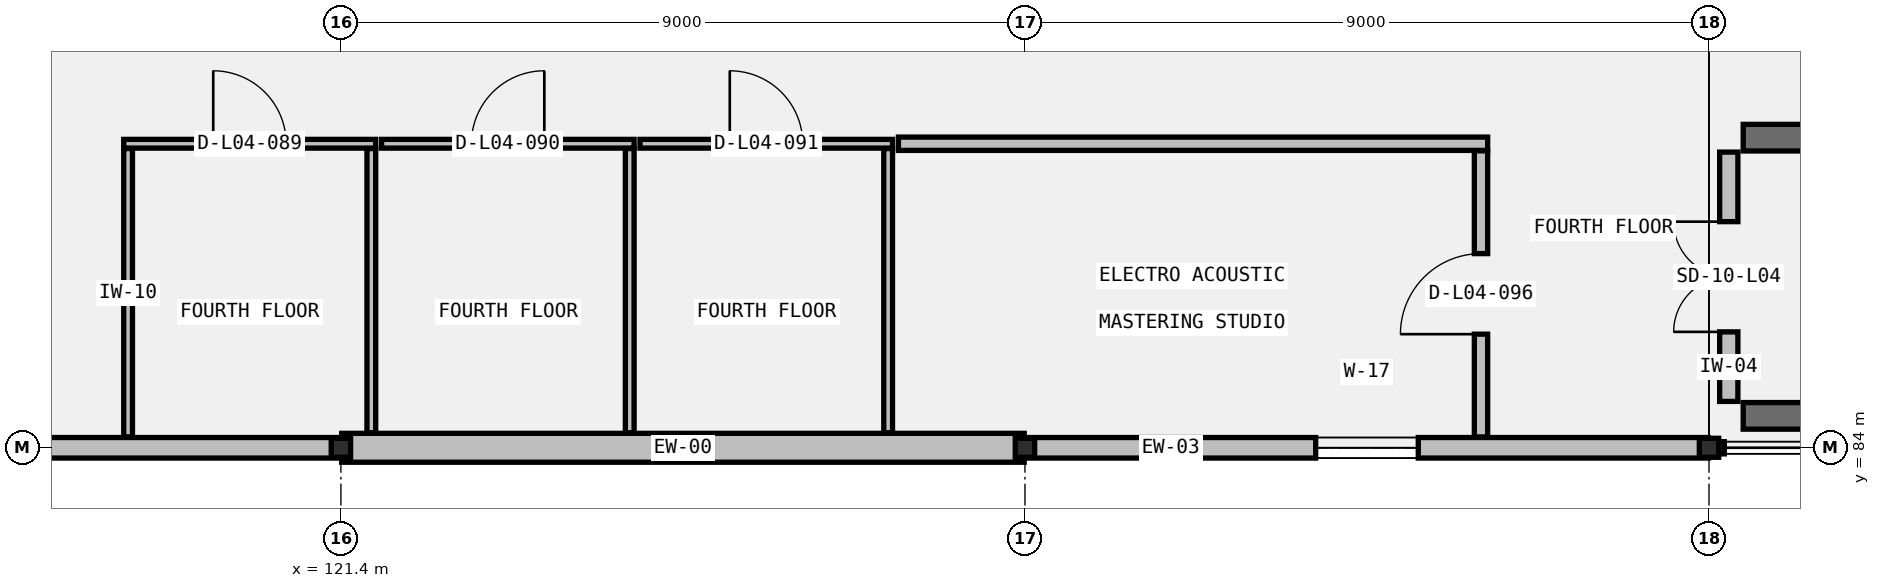
"""IFC4 building model, lengths in metres.
Left out: names, types, materials, properties, quantities, classifications, styles, units other than length and angle.
Written with IfcOpenShell. Run it as: python <this file> out.ifc"""

import sys

from ifc_helpers import new_model, si_unit, direction, frame, frame_2d, origin, origin_2d, place, context, subcontext, project, spatial, rectangle, i_section, extrude, element, fill, save


model = new_model("IFC4")
c1 = context("Model", 3, precision=1e-05, world=origin(), true_north=direction((0.0, 1.0)))
c2 = subcontext(c1, "Body", "Model", "MODEL_VIEW")
j1 = project(units=[si_unit("LENGTHUNIT", "METRE"), si_unit("PLANEANGLEUNIT", "RADIAN")], contexts=[c1])
p1 = place(None, origin())
s1 = spatial("IfcSite", under=j1, at=p1, CompositionType="ELEMENT")
p2 = place(p1, origin())
s2 = spatial("IfcBuilding", under=s1, at=p2, CompositionType="ELEMENT")
p3 = place(p2, frame((0.0, 0.0, 19.2)))
s3 = spatial("IfcBuildingStorey", under=s2, at=p3, CompositionType="ELEMENT", Elevation=19.2)
for number, where, z_axis, x_axis in (
    (1, (121.4, 84.0, 0.0), (0.0, 0.0, 1.0), (1.0, 0.0, 0.0)),
    (2, (130.4, 84.0, 0.0), (0.0, 0.0, 1.0), (1.0, 0.0, 0.0)),
    (3, (139.4, 84.0, 0.0), (0.0, 0.0, 1.0), (1.0, 0.0, 0.0)),
):
    element("IfcColumn", number, at=place(p3, frame(where, z_axis=z_axis, x_axis=x_axis)), inside=s3, PredefinedType="COLUMN", context=c2, shape_type="SweptSolid", body=[
        extrude(i_section(OverallWidth=0.255, OverallDepth=0.25, WebThickness=0.014, FlangeThickness=0.014, FilletRadius=0.016, at=origin_2d()), origin(), (0.0, 0.0, 1.0), 4.6),
    ])
for number, where, z_axis, x_axis in (
    (4, (139.85, 84.42, 0.0), (0.0, 0.0, 1.0), (1.0, 0.0, 0.0)),
    (5, (148.0, 88.08, 0.0), (0.0, 0.0, 1.0), (-1.0, 0.0, 0.0)),
):
    element("IfcWall", number, at=place(p3, frame(where, z_axis=z_axis, x_axis=x_axis)), inside=s3, PredefinedType="SHEAR", context=c2, shape_type="SweptSolid", body=[
        extrude(rectangle(XDim=8.15, YDim=0.35, at=frame_2d((4.075, 0.0))), origin(), (0.0, 0.0, 1.0), 4.34),
    ])
p4 = place(p3, frame((112.754, 84.0, 0.0), z_axis=(0.0, 0.0, 1.0), x_axis=(1.0, 0.0, 0.0)))
e6 = element("IfcWall", 6, at=p4, inside=s3, PredefinedType="STANDARD", context=c2, shape_type="SweptSolid", body=[
    extrude(rectangle(XDim=8.636, YDim=0.27, at=frame_2d((4.318, 0.0))), origin(), (0.0, 0.0, 1.0), 3.878),
])
p5 = place(p4, frame((3.843, 0.0, 0.95)))
e7 = element("IfcOpeningElement", 7, at=p5, cuts=e6, PredefinedType="OPENING", context=c2, shape_type="SweptSolid", body=[
    extrude(rectangle(XDim=0.95, YDim=1.55, at=frame_2d((0.475, 0.775))), frame((0.0, 0.145, 0.0), z_axis=(0.0, -1.0, 0.0), x_axis=(1.0, 0.0, 0.0)), (0.0, 0.0, 1.0), 0.29),
])
p6 = place(p3, frame((121.41, 84.0, 0.0), z_axis=(0.0, 0.0, 1.0), x_axis=(1.0, 0.0, 0.0)))
e8 = element("IfcWall", 8, at=p6, inside=s3, PredefinedType="STANDARD", context=c2, shape_type="SweptSolid", body=[
    extrude(rectangle(XDim=8.98, YDim=0.38, at=frame_2d((4.49, 0.0))), origin(), (0.0, 0.0, 1.0), 3.878),
])
p7 = place(p3, frame((130.41, 84.0, 0.0), z_axis=(0.0, 0.0, 1.0), x_axis=(1.0, 0.0, 0.0)))
e9 = element("IfcWall", 9, at=p7, inside=s3, PredefinedType="STANDARD", context=c2, shape_type="SweptSolid", body=[
    extrude(rectangle(XDim=8.98, YDim=0.27, at=frame_2d((4.49, 0.0))), origin(), (0.0, 0.0, 1.0), 3.878),
])
p8 = place(p7, frame((3.815, 0.0, 0.95)))
e10 = element("IfcOpeningElement", 10, at=p8, cuts=e9, PredefinedType="OPENING", context=c2, shape_type="SweptSolid", body=[
    extrude(rectangle(XDim=1.35, YDim=1.85, at=frame_2d((0.675, 0.925))), frame((0.0, 0.145, 0.0), z_axis=(0.0, -1.0, 0.0), x_axis=(1.0, 0.0, 0.0)), (0.0, 0.0, 1.0), 0.29),
])
p9 = place(p3, frame((139.66, 84.61, 0.0), z_axis=(0.0, 0.0, 1.0), x_axis=(0.0, 1.0, 0.0)))
e11 = element("IfcWall", 11, at=p9, inside=s3, PredefinedType="STANDARD", context=c2, shape_type="SweptSolid", body=[
    extrude(rectangle(XDim=3.28, YDim=0.24, at=frame_2d((1.64, 0.0))), origin(), (0.0, 0.0, 1.0), 4.34),
])
p10 = place(p9, frame((0.915, 0.0, 0.0)))
e12 = element("IfcOpeningElement", 12, at=p10, cuts=e11, PredefinedType="OPENING", context=c2, shape_type="SweptSolid", body=[
    extrude(rectangle(XDim=1.45, YDim=2.2, at=frame_2d((0.725, 1.1))), frame((0.0, 0.13, 0.0), z_axis=(0.0, -1.0, 0.0), x_axis=(1.0, 0.0, 0.0)), (0.0, 0.0, 1.0), 0.26),
])
p11 = place(p3, frame((118.542, 88.0, 0.0), z_axis=(0.0, 0.0, 1.0), x_axis=(1.0, 0.0, 0.0)))
e13 = element("IfcWall", 13, at=p11, inside=s3, PredefinedType="PARTITIONING", context=c2, shape_type="SweptSolid", body=[
    extrude(rectangle(XDim=3.315, YDim=0.115, at=frame_2d((1.657, 0.0))), origin(), (0.0, 0.0, 1.0), 3.968),
])
p12 = place(p11, frame((1.177, 0.0, 0.0)))
e14 = element("IfcOpeningElement", 14, at=p12, cuts=e13, PredefinedType="OPENING", context=c2, shape_type="SweptSolid", body=[
    extrude(rectangle(XDim=0.96, YDim=2.08, at=frame_2d((0.48, 1.04))), frame((0.0, 0.067, 0.0), z_axis=(0.0, -1.0, 0.0), x_axis=(1.0, 0.0, 0.0)), (0.0, 0.0, 1.0), 0.135),
])
p13 = place(p3, frame((121.8, 84.198, 0.0), z_axis=(0.0, 0.0, 1.0), x_axis=(0.0, 1.0, 0.0)))
e15 = element("IfcWall", 15, at=p13, inside=s3, PredefinedType="PARTITIONING", context=c2, shape_type="SweptSolid", body=[
    extrude(rectangle(XDim=3.739, YDim=0.115, at=frame_2d((1.869, 0.0))), origin(), (0.0, 0.0, 1.0), 3.878),
])
p14 = place(p3, frame((118.6, 84.143, 0.0), z_axis=(0.0, 0.0, 1.0), x_axis=(0.0, 1.0, 0.0)))
e16 = element("IfcWall", 16, at=p14, inside=s3, PredefinedType="PARTITIONING", context=c2, shape_type="SweptSolid", body=[
    extrude(rectangle(XDim=3.793, YDim=0.115, at=frame_2d((1.897, 0.0))), origin(), (0.0, 0.0, 1.0), 3.878),
])
p15 = place(p3, frame((121.935, 88.0, 0.0), z_axis=(0.0, 0.0, 1.0), x_axis=(1.0, 0.0, 0.0)))
e17 = element("IfcWall", 17, at=p15, inside=s3, PredefinedType="PARTITIONING", context=c2, shape_type="SweptSolid", body=[
    extrude(rectangle(XDim=3.323, YDim=0.115, at=frame_2d((1.661, 0.0))), origin(), (0.0, 0.0, 1.0), 3.968),
])
p16 = place(p15, frame((1.181, 0.0, 0.0)))
e18 = element("IfcOpeningElement", 18, at=p16, cuts=e17, PredefinedType="OPENING", context=c2, shape_type="SweptSolid", body=[
    extrude(rectangle(XDim=0.96, YDim=2.08, at=frame_2d((0.48, 1.04))), frame((0.0, 0.067, 0.0), z_axis=(0.0, -1.0, 0.0), x_axis=(1.0, 0.0, 0.0)), (0.0, 0.0, 1.0), 0.135),
])
p17 = place(p3, frame((125.2, 84.198, 0.0), z_axis=(0.0, 0.0, 1.0), x_axis=(0.0, 1.0, 0.0)))
e19 = element("IfcWall", 19, at=p17, inside=s3, PredefinedType="PARTITIONING", context=c2, shape_type="SweptSolid", body=[
    extrude(rectangle(XDim=3.739, YDim=0.115, at=frame_2d((1.869, 0.0))), origin(), (0.0, 0.0, 1.0), 3.878),
])
p18 = place(p3, frame((125.335, 88.0, 0.0), z_axis=(0.0, 0.0, 1.0), x_axis=(1.0, 0.0, 0.0)))
e20 = element("IfcWall", 20, at=p18, inside=s3, PredefinedType="PARTITIONING", context=c2, shape_type="SweptSolid", body=[
    extrude(rectangle(XDim=3.323, YDim=0.115, at=frame_2d((1.661, 0.0))), origin(), (0.0, 0.0, 1.0), 3.968),
])
p19 = place(p18, frame((1.181, 0.0, 0.0)))
e21 = element("IfcOpeningElement", 21, at=p19, cuts=e20, PredefinedType="OPENING", context=c2, shape_type="SweptSolid", body=[
    extrude(rectangle(XDim=0.96, YDim=2.08, at=frame_2d((0.48, 1.04))), frame((0.0, 0.067, 0.0), z_axis=(0.0, -1.0, 0.0), x_axis=(1.0, 0.0, 0.0)), (0.0, 0.0, 1.0), 0.135),
])
p20 = place(p3, frame((128.6, 84.198, 0.0), z_axis=(0.0, 0.0, 1.0), x_axis=(0.0, 1.0, 0.0)))
e22 = element("IfcWall", 22, at=p20, inside=s3, PredefinedType="PARTITIONING", context=c2, shape_type="SweptSolid", body=[
    extrude(rectangle(XDim=3.739, YDim=0.115, at=frame_2d((1.869, 0.0))), origin(), (0.0, 0.0, 1.0), 3.878),
])
p21 = place(p3, frame((128.735, 88.0, 0.0), z_axis=(0.0, 0.0, 1.0), x_axis=(1.0, 0.0, 0.0)))
e23 = element("IfcWall", 23, at=p21, inside=s3, PredefinedType="PARTITIONING", context=c2, shape_type="SweptSolid", body=[
    extrude(rectangle(XDim=7.752, YDim=0.175, at=frame_2d((3.876, 0.0))), origin(), (0.0, 0.0, 1.0), 3.968),
])
p22 = place(p3, frame((136.4, 84.143, 0.0), z_axis=(0.0, 0.0, 1.0), x_axis=(0.0, 1.0, 0.0)))
e24 = element("IfcWall", 24, at=p22, inside=s3, PredefinedType="PARTITIONING", context=c2, shape_type="SweptSolid", body=[
    extrude(rectangle(XDim=3.763, YDim=0.175, at=frame_2d((1.882, 0.0))), origin(), (0.0, 0.0, 1.0), 3.878),
])
p23 = place(p22, frame((1.352, 0.0, 0.0)))
e25 = element("IfcOpeningElement", 25, at=p23, cuts=e24, PredefinedType="OPENING", context=c2, shape_type="SweptSolid", body=[
    extrude(rectangle(XDim=1.06, YDim=2.15, at=frame_2d((0.53, 1.075))), frame((0.0, 0.097, 0.0), z_axis=(0.0, -1.0, 0.0), x_axis=(1.0, 0.0, 0.0)), (0.0, 0.0, 1.0), 0.195),
])
p24 = place(p8, origin())
e26 = element("IfcWindow", 26, at=p24, inside=s3, PartitioningType="SINGLE_PANEL", PredefinedType="WINDOW", context=c2, shape_type="SweptSolid", body=[
    extrude(rectangle(XDim=1.35, YDim=1.85, at=frame_2d((0.675, 0.925))), frame((0.0, 0.03, 0.0), z_axis=(0.0, -1.0, 0.0), x_axis=(1.0, 0.0, 0.0)), (0.0, 0.0, 1.0), 0.06),
])
fill(e10, e26)
p25 = place(p10, origin())
e27 = element("IfcDoor", 27, at=p25, inside=s3, OperationType="DOUBLE_DOOR_SINGLE_SWING", PredefinedType="DOOR", context=c2, shape_type="SweptSolid", body=[
    extrude(rectangle(XDim=1.45, YDim=2.2, at=frame_2d((0.725, 1.1))), frame((0.0, 0.025, 0.0), z_axis=(0.0, -1.0, 0.0), x_axis=(1.0, 0.0, 0.0)), (0.0, 0.0, 1.0), 0.05),
])
fill(e12, e27)
p26 = place(p12, origin())
e28 = element("IfcDoor", 28, at=p26, inside=s3, OperationType="SINGLE_SWING_LEFT", PredefinedType="DOOR", context=c2, shape_type="SweptSolid", body=[
    extrude(rectangle(XDim=0.96, YDim=2.08, at=frame_2d((0.48, 1.04))), frame((0.0, 0.025, 0.0), z_axis=(0.0, -1.0, 0.0), x_axis=(1.0, 0.0, 0.0)), (0.0, 0.0, 1.0), 0.05),
])
fill(e14, e28)
p27 = place(p16, origin())
e29 = element("IfcDoor", 29, at=p27, inside=s3, OperationType="SINGLE_SWING_RIGHT", PredefinedType="DOOR", context=c2, shape_type="SweptSolid", body=[
    extrude(rectangle(XDim=0.96, YDim=2.08, at=frame_2d((0.48, 1.04))), frame((0.0, 0.025, 0.0), z_axis=(0.0, -1.0, 0.0), x_axis=(1.0, 0.0, 0.0)), (0.0, 0.0, 1.0), 0.05),
])
fill(e18, e29)
p28 = place(p19, origin())
e30 = element("IfcDoor", 30, at=p28, inside=s3, OperationType="SINGLE_SWING_LEFT", PredefinedType="DOOR", context=c2, shape_type="SweptSolid", body=[
    extrude(rectangle(XDim=0.96, YDim=2.08, at=frame_2d((0.48, 1.04))), frame((0.0, 0.025, 0.0), z_axis=(0.0, -1.0, 0.0), x_axis=(1.0, 0.0, 0.0)), (0.0, 0.0, 1.0), 0.05),
])
fill(e21, e30)
p29 = place(p23, origin())
e31 = element("IfcDoor", 31, at=p29, inside=s3, OperationType="SINGLE_SWING_LEFT", PredefinedType="DOOR", context=c2, shape_type="SweptSolid", body=[
    extrude(rectangle(XDim=1.06, YDim=2.15, at=frame_2d((0.53, 1.075))), frame((0.0, 0.025, 0.0), z_axis=(0.0, -1.0, 0.0), x_axis=(1.0, 0.0, 0.0)), (0.0, 0.0, 1.0), 0.05),
])
fill(e25, e31)
save(model, sys.argv[1])
